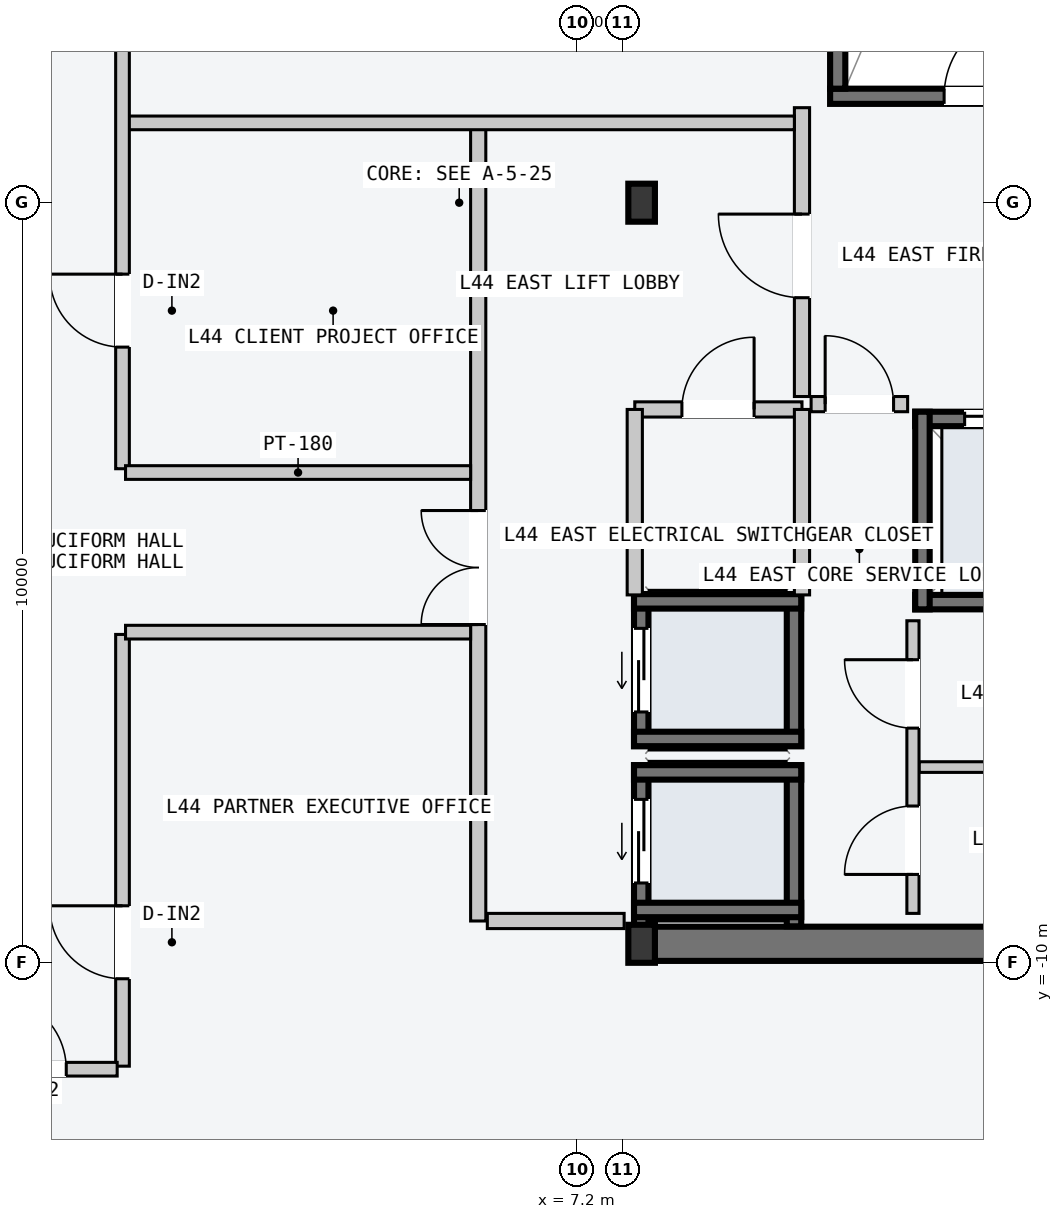
"""IFC4 building model, lengths in metres.
Left out: names, types, materials, properties, quantities, classifications, styles, units other than length and angle.
Written with IfcOpenShell. Run it as: python <this file> out.ifc"""

import sys

from ifc_helpers import new_model, si_unit, direction, frame, frame_2d, origin, origin_2d, place, context, subcontext, project, spatial, rectangle, i_section, extrude, element, fill, save


model = new_model("IFC4")
c1 = context("Model", 3, precision=1e-05, world=origin(), true_north=direction((0.0, 1.0)))
c2 = subcontext(c1, "Body", "Model", "MODEL_VIEW")
j1 = project(units=[si_unit("LENGTHUNIT", "METRE"), si_unit("PLANEANGLEUNIT", "RADIAN")], contexts=[c1])
p1 = place(None, origin())
s1 = spatial("IfcSite", under=j1, at=p1, CompositionType="ELEMENT")
p2 = place(p1, origin())
s2 = spatial("IfcBuilding", under=s1, at=p2, CompositionType="ELEMENT")
p3 = place(p2, frame((0.0, 0.0, 169.5)))
s3 = spatial("IfcBuildingStorey", under=s2, at=p3, CompositionType="ELEMENT", Elevation=169.5)
p4 = place(p3, frame((8.07, -9.75, -0.2), z_axis=(0.0, 0.0, 1.0), x_axis=(1.0, 0.0, 0.0)))
e1 = element("IfcWall", 1, at=p4, inside=s3, PredefinedType="SHEAR", context=c2, shape_type="SweptSolid", body=[
    extrude(rectangle(XDim=6.46, YDim=0.45, at=frame_2d((3.23, 0.0))), origin(), (0.0, 0.0, 1.0), 3.6),
])
p5 = place(p3, frame((10.53, 1.4, -0.2), z_axis=(0.0, 0.0, 1.0), x_axis=(1.0, 0.0, 0.0)))
e2 = element("IfcWall", 2, at=p5, inside=s3, PredefinedType="SOLIDWALL", context=c2, shape_type="SweptSolid", body=[
    extrude(rectangle(XDim=3.72, YDim=0.2, at=frame_2d((1.86, 0.0))), origin(), (0.0, 0.0, 1.0), 3.6),
])
p6 = place(p5, frame((1.5, 0.0, 0.2)))
e3 = element("IfcOpeningElement", 3, at=p6, cuts=e2, PredefinedType="OPENING", context=c2, shape_type="SweptSolid", body=[
    extrude(rectangle(XDim=1.12, YDim=2.18, at=frame_2d((0.56, 1.09))), frame((0.0, 0.11, 0.0), z_axis=(0.0, -1.0, 0.0), x_axis=(1.0, 0.0, 0.0)), (0.0, 0.0, 1.0), 0.22),
])
p7 = place(p3, frame((10.63, 1.5, -0.2), z_axis=(0.0, 0.0, 1.0), x_axis=(0.0, 1.0, 0.0)))
e4 = element("IfcWall", 4, at=p7, inside=s3, PredefinedType="SOLIDWALL", context=c2, shape_type="SweptSolid", body=[
    extrude(rectangle(XDim=7.8, YDim=0.2, at=frame_2d((3.9, 0.0))), origin(), (0.0, 0.0, 1.0), 3.6),
])
for number, where, z_axis, x_axis in (
    (5, (8.05, -9.75, 0.0), (0.0, 0.0, 1.0), (1.0, 0.0, 0.0)),
    (6, (8.05, 0.0, 0.0), (0.0, 0.0, 1.0), (1.0, 0.0, 0.0)),
):
    element("IfcColumn", number, at=place(p3, frame(where, z_axis=z_axis, x_axis=x_axis)), inside=s3, PredefinedType="COLUMN", context=c2, shape_type="SweptSolid", body=[
        extrude(i_section(OverallWidth=0.35, OverallDepth=0.5, WebThickness=0.02, FlangeThickness=0.032, at=origin_2d()), origin(), (0.0, 0.0, 1.0), 3.6),
    ])
p8 = place(p3, frame((8.045, -9.52, -0.2), z_axis=(0.0, 0.0, 1.0), x_axis=(0.0, 1.0, 0.0)))
e7 = element("IfcWall", 7, at=p8, inside=s3, PredefinedType="SOLIDWALL", context=c2, shape_type="SweptSolid", body=[
    extrude(rectangle(XDim=2.12, YDim=0.19, at=frame_2d((1.06, 0.0))), origin(), (0.0, 0.0, 1.0), 3.6),
])
p9 = place(p8, frame((0.57, 0.0, 0.2)))
e8 = element("IfcOpeningElement", 8, at=p9, cuts=e7, PredefinedType="OPENING", context=c2, shape_type="SweptSolid", body=[
    extrude(rectangle(XDim=1.1, YDim=2.2, at=frame_2d((0.55, 1.1))), frame((0.0, 0.105, 0.0), z_axis=(0.0, -1.0, 0.0), x_axis=(1.0, 0.0, 0.0)), (0.0, 0.0, 1.0), 0.21),
])
p10 = place(p3, frame((10.055, -9.52, -0.2), z_axis=(0.0, 0.0, 1.0), x_axis=(0.0, 1.0, 0.0)))
e9 = element("IfcWall", 9, at=p10, inside=s3, PredefinedType="SOLIDWALL", context=c2, shape_type="SweptSolid", body=[
    extrude(rectangle(XDim=2.12, YDim=0.19, at=frame_2d((1.06, 0.0))), origin(), (0.0, 0.0, 1.0), 3.6),
])
for number, where, z_axis, x_axis in (
    (10, (7.95, -7.495, -0.2), (0.0, 0.0, 1.0), (1.0, 0.0, 0.0)),
    (11, (7.95, -9.305, -0.2), (0.0, 0.0, 1.0), (1.0, 0.0, 0.0)),
):
    element("IfcWall", number, at=place(p3, frame(where, z_axis=z_axis, x_axis=x_axis)), inside=s3, PredefinedType="SOLIDWALL", context=c2, shape_type="SweptSolid", body=[
        extrude(rectangle(XDim=2.2, YDim=0.19, at=frame_2d((1.1, 0.0))), origin(), (0.0, 0.0, 1.0), 3.6),
    ])
p11 = place(p3, frame((8.045, -7.15, -0.2), z_axis=(0.0, 0.0, 1.0), x_axis=(0.0, 1.0, 0.0)))
e12 = element("IfcWall", 12, at=p11, inside=s3, PredefinedType="SOLIDWALL", context=c2, shape_type="SweptSolid", body=[
    extrude(rectangle(XDim=2.0, YDim=0.19, at=frame_2d((1.0, 0.0))), origin(), (0.0, 0.0, 1.0), 3.6),
])
p12 = place(p11, frame((0.45, 0.0, 0.2)))
e13 = element("IfcOpeningElement", 13, at=p12, cuts=e12, PredefinedType="OPENING", context=c2, shape_type="SweptSolid", body=[
    extrude(rectangle(XDim=1.1, YDim=2.2, at=frame_2d((0.55, 1.1))), frame((0.0, 0.105, 0.0), z_axis=(0.0, -1.0, 0.0), x_axis=(1.0, 0.0, 0.0)), (0.0, 0.0, 1.0), 0.21),
])
p13 = place(p3, frame((10.055, -7.15, -0.2), z_axis=(0.0, 0.0, 1.0), x_axis=(0.0, 1.0, 0.0)))
e14 = element("IfcWall", 14, at=p13, inside=s3, PredefinedType="SOLIDWALL", context=c2, shape_type="SweptSolid", body=[
    extrude(rectangle(XDim=2.0, YDim=0.19, at=frame_2d((1.0, 0.0))), origin(), (0.0, 0.0, 1.0), 3.6),
])
for number, where, z_axis, x_axis in (
    (15, (7.95, -5.245, -0.2), (0.0, 0.0, 1.0), (1.0, 0.0, 0.0)),
    (16, (7.95, -7.055, -0.2), (0.0, 0.0, 1.0), (1.0, 0.0, 0.0)),
):
    element("IfcWall", number, at=place(p3, frame(where, z_axis=z_axis, x_axis=x_axis)), inside=s3, PredefinedType="SOLIDWALL", context=c2, shape_type="SweptSolid", body=[
        extrude(rectangle(XDim=2.2, YDim=0.19, at=frame_2d((1.1, 0.0))), origin(), (0.0, 0.0, 1.0), 3.6),
    ])
p14 = place(p3, frame((11.65, -2.845, -0.2), z_axis=(0.0, 0.0, 1.0), x_axis=(1.0, 0.0, 0.0)))
e17 = element("IfcWall", 17, at=p14, inside=s3, PredefinedType="SOLIDWALL", context=c2, shape_type="SweptSolid", body=[
    extrude(rectangle(XDim=2.68, YDim=0.19, at=frame_2d((1.34, 0.0))), origin(), (0.0, 0.0, 1.0), 3.6),
])
p15 = place(p14, frame((0.65, 0.0, 0.2)))
e18 = element("IfcOpeningElement", 18, at=p15, cuts=e17, PredefinedType="OPENING", context=c2, shape_type="SweptSolid", body=[
    extrude(rectangle(XDim=1.2, YDim=2.2, at=frame_2d((0.6, 1.1))), frame((0.0, 0.105, 0.0), z_axis=(0.0, -1.0, 0.0), x_axis=(1.0, 0.0, 0.0)), (0.0, 0.0, 1.0), 0.21),
])
p16 = place(p3, frame((11.65, -5.255, -0.2), z_axis=(0.0, 0.0, 1.0), x_axis=(1.0, 0.0, 0.0)))
e19 = element("IfcWall", 19, at=p16, inside=s3, PredefinedType="SOLIDWALL", context=c2, shape_type="SweptSolid", body=[
    extrude(rectangle(XDim=2.68, YDim=0.19, at=frame_2d((1.34, 0.0))), origin(), (0.0, 0.0, 1.0), 3.6),
])
p17 = place(p3, frame((11.745, -5.35, -0.2), z_axis=(0.0, 0.0, 1.0), x_axis=(0.0, 1.0, 0.0)))
e20 = element("IfcWall", 20, at=p17, inside=s3, PredefinedType="SOLIDWALL", context=c2, shape_type="SweptSolid", body=[
    extrude(rectangle(XDim=2.6, YDim=0.19, at=frame_2d((1.3, 0.0))), origin(), (0.0, 0.0, 1.0), 3.6),
])
p18 = place(p3, frame((5.9, -9.45, 0.0), z_axis=(0.0, 0.0, 1.0), x_axis=(0.0, 1.0, 0.0)))
e21 = element("IfcWall", 21, at=p18, inside=s3, PredefinedType="PARTITIONING", context=c2, shape_type="SweptSolid", body=[
    extrude(rectangle(XDim=10.5, YDim=0.2, at=frame_2d((5.25, 0.0))), origin(), (0.0, 0.0, 1.0), 3.4),
])
p19 = place(p18, frame((3.9, 0.0, 0.0)))
e22 = element("IfcOpeningElement", 22, at=p19, cuts=e21, PredefinedType="OPENING", context=c2, shape_type="SweptSolid", body=[
    extrude(rectangle(XDim=1.5, YDim=2.2, at=frame_2d((0.75, 1.1))), frame((0.0, 0.11, 0.0), z_axis=(0.0, -1.0, 0.0), x_axis=(1.0, 0.0, 0.0)), (0.0, 0.0, 1.0), 0.22),
])
p20 = place(p3, frame((6.02, -9.45, 0.0), z_axis=(0.0, 0.0, 1.0), x_axis=(1.0, 0.0, 0.0)))
e23 = element("IfcWall", 23, at=p20, inside=s3, PredefinedType="PARTITIONING", context=c2, shape_type="SweptSolid", body=[
    extrude(rectangle(XDim=1.8, YDim=0.2, at=frame_2d((0.9, 0.0))), origin(), (0.0, 0.0, 1.0), 3.4),
])
p21 = place(p3, frame((10.16, -2.55, 0.0), z_axis=(0.0, 0.0, 1.0), x_axis=(0.0, 1.0, 0.0)))
e24 = element("IfcWall", 24, at=p21, inside=s3, PredefinedType="PARTITIONING", context=c2, shape_type="SweptSolid", body=[
    extrude(rectangle(XDim=3.8, YDim=0.2, at=frame_2d((1.9, 0.0))), origin(), (0.0, 0.0, 1.0), 3.4),
])
p22 = place(p21, frame((1.3, 0.0, 0.0)))
e25 = element("IfcOpeningElement", 25, at=p22, cuts=e24, PredefinedType="OPENING", context=c2, shape_type="SweptSolid", body=[
    extrude(rectangle(XDim=1.1, YDim=2.15, at=frame_2d((0.55, 1.075))), frame((0.0, 0.11, 0.0), z_axis=(0.0, -1.0, 0.0), x_axis=(1.0, 0.0, 0.0)), (0.0, 0.0, 1.0), 0.22),
])
p23 = place(p3, frame((10.28, -2.65, 0.0), z_axis=(0.0, 0.0, 1.0), x_axis=(1.0, 0.0, 0.0)))
e26 = element("IfcWall", 26, at=p23, inside=s3, PredefinedType="PARTITIONING", context=c2, shape_type="SweptSolid", body=[
    extrude(rectangle(XDim=1.27, YDim=0.2, at=frame_2d((0.635, 0.0))), origin(), (0.0, 0.0, 1.0), 3.4),
])
p24 = place(p23, frame((0.185, 0.0, 0.0)))
e27 = element("IfcOpeningElement", 27, at=p24, cuts=e26, PredefinedType="OPENING", context=c2, shape_type="SweptSolid", body=[
    extrude(rectangle(XDim=0.9, YDim=2.15, at=frame_2d((0.45, 1.075))), frame((0.0, 0.11, 0.0), z_axis=(0.0, -1.0, 0.0), x_axis=(1.0, 0.0, 0.0)), (0.0, 0.0, 1.0), 0.22),
])
p25 = place(p3, frame((7.96, -2.72, 0.0), z_axis=(0.0, 0.0, 1.0), x_axis=(1.0, 0.0, 0.0)))
e28 = element("IfcWall", 28, at=p25, inside=s3, PredefinedType="PARTITIONING", context=c2, shape_type="SweptSolid", body=[
    extrude(rectangle(XDim=2.2, YDim=0.2, at=frame_2d((1.1, 0.0))), origin(), (0.0, 0.0, 1.0), 3.4),
])
p26 = place(p25, frame((0.62, 0.0, 0.0)))
e29 = element("IfcOpeningElement", 29, at=p26, cuts=e28, PredefinedType="OPENING", context=c2, shape_type="SweptSolid", body=[
    extrude(rectangle(XDim=0.95, YDim=2.1, at=frame_2d((0.475, 1.05))), frame((0.0, 0.11, 0.0), z_axis=(0.0, -1.0, 0.0), x_axis=(1.0, 0.0, 0.0)), (0.0, 0.0, 1.0), 0.22),
])
for number, where, z_axis, x_axis in (
    (30, (7.96, -5.16, 0.0), (0.0, 0.0, 1.0), (0.0, 1.0, 0.0)),
    (31, (10.16, -5.16, 0.0), (0.0, 0.0, 1.0), (0.0, 1.0, 0.0)),
):
    element("IfcWall", number, at=place(p3, frame(where, z_axis=z_axis, x_axis=x_axis)), inside=s3, PredefinedType="PARTITIONING", context=c2, shape_type="SweptSolid", body=[
        extrude(rectangle(XDim=2.44, YDim=0.2, at=frame_2d((1.22, 0.0))), origin(), (0.0, 0.0, 1.0), 3.4),
    ])
p27 = place(p3, frame((11.7, -7.425, 0.0), z_axis=(0.0, 0.0, 1.0), x_axis=(1.0, 0.0, 0.0)))
e32 = element("IfcWall", 32, at=p27, inside=s3, PredefinedType="PARTITIONING", context=c2, shape_type="SweptSolid", body=[
    extrude(rectangle(XDim=2.5, YDim=0.14, at=frame_2d((1.25, 0.0))), origin(), (0.0, 0.0, 1.0), 3.4),
])
p28 = place(p3, frame((11.62, -9.35, 0.0), z_axis=(0.0, 0.0, 1.0), x_axis=(0.0, 1.0, 0.0)))
e33 = element("IfcWall", 33, at=p28, inside=s3, PredefinedType="PARTITIONING", context=c2, shape_type="SweptSolid", body=[
    extrude(rectangle(XDim=3.85, YDim=0.16, at=frame_2d((1.925, 0.0))), origin(), (0.0, 0.0, 1.0), 3.4),
])
p29 = place(p28, frame((0.512, 0.0, 0.0)))
e34 = element("IfcOpeningElement", 34, at=p29, cuts=e33, PredefinedType="OPENING", context=c2, shape_type="SweptSolid", body=[
    extrude(rectangle(XDim=0.9, YDim=2.15, at=frame_2d((0.45, 1.075))), frame((0.0, 0.09, 0.0), z_axis=(0.0, -1.0, 0.0), x_axis=(1.0, 0.0, 0.0)), (0.0, 0.0, 1.0), 0.18),
])
p30 = place(p28, frame((2.438, 0.0, 0.0)))
e35 = element("IfcOpeningElement", 35, at=p30, cuts=e33, PredefinedType="OPENING", context=c2, shape_type="SweptSolid", body=[
    extrude(rectangle(XDim=0.9, YDim=2.15, at=frame_2d((0.45, 1.075))), frame((0.0, 0.09, 0.0), z_axis=(0.0, -1.0, 0.0), x_axis=(1.0, 0.0, 0.0)), (0.0, 0.0, 1.0), 0.18),
])
p31 = place(p3, frame((1.26, 1.05, 0.0), z_axis=(0.0, 0.0, 1.0), x_axis=(1.0, 0.0, 0.0)))
e36 = element("IfcWall", 36, at=p31, inside=s3, PredefinedType="PARTITIONING", context=c2, shape_type="SweptSolid", body=[
    extrude(rectangle(XDim=8.8, YDim=0.18, at=frame_2d((4.4, 0.0))), origin(), (0.0, 0.0, 1.0), 3.4),
])
p32 = place(p3, frame((1.22, -3.5, 0.0), z_axis=(0.0, 0.0, 1.0), x_axis=(0.0, 1.0, 0.0)))
e37 = element("IfcWall", 37, at=p32, inside=s3, PredefinedType="PARTITIONING", context=c2, shape_type="SweptSolid", body=[
    extrude(rectangle(XDim=14.86, YDim=0.18, at=frame_2d((7.43, 0.0))), origin(), (0.0, 0.0, 1.0), 3.4),
])
p33 = place(p32, frame((6.1, 0.0, 0.0)))
e38 = element("IfcOpeningElement", 38, at=p33, cuts=e37, PredefinedType="OPENING", context=c2, shape_type="SweptSolid", body=[
    extrude(rectangle(XDim=1.24, YDim=2.24, at=frame_2d((0.62, 1.12))), frame((0.0, 0.1, 0.0), z_axis=(0.0, -1.0, 0.0), x_axis=(1.0, 0.0, 0.0)), (0.0, 0.0, 1.0), 0.2),
])
p34 = place(p32, frame((1.6, 0.0, 0.0)))
e39 = element("IfcOpeningElement", 39, at=p34, cuts=e37, PredefinedType="OPENING", context=c2, shape_type="SweptSolid", body=[
    extrude(rectangle(XDim=0.96, YDim=2.18, at=frame_2d((0.48, 1.09))), frame((0.0, 0.1, 0.0), z_axis=(0.0, -1.0, 0.0), x_axis=(1.0, 0.0, 0.0)), (0.0, 0.0, 1.0), 0.2),
])
p35 = place(p3, frame((1.26, -3.55, 0.0), z_axis=(0.0, 0.0, 1.0), x_axis=(1.0, 0.0, 0.0)))
e40 = element("IfcWall", 40, at=p35, inside=s3, PredefinedType="PARTITIONING", context=c2, shape_type="SweptSolid", body=[
    extrude(rectangle(XDim=4.54, YDim=0.18, at=frame_2d((2.27, 0.0))), origin(), (0.0, 0.0, 1.0), 3.4),
])
p36 = place(p3, frame((1.22, -11.36, 0.0), z_axis=(0.0, 0.0, 1.0), x_axis=(0.0, 1.0, 0.0)))
e41 = element("IfcWall", 41, at=p36, inside=s3, PredefinedType="PARTITIONING", context=c2, shape_type="SweptSolid", body=[
    extrude(rectangle(XDim=5.68, YDim=0.18, at=frame_2d((2.84, 0.0))), origin(), (0.0, 0.0, 1.0), 3.4),
])
p37 = place(p36, frame((1.15, 0.0, 0.0)))
e42 = element("IfcOpeningElement", 42, at=p37, cuts=e41, PredefinedType="OPENING", context=c2, shape_type="SweptSolid", body=[
    extrude(rectangle(XDim=0.96, YDim=2.18, at=frame_2d((0.48, 1.09))), frame((0.0, 0.1, 0.0), z_axis=(0.0, -1.0, 0.0), x_axis=(1.0, 0.0, 0.0)), (0.0, 0.0, 1.0), 0.2),
])
p38 = place(p3, frame((1.26, -5.65, 0.0), z_axis=(0.0, 0.0, 1.0), x_axis=(1.0, 0.0, 0.0)))
e43 = element("IfcWall", 43, at=p38, inside=s3, PredefinedType="PARTITIONING", context=c2, shape_type="SweptSolid", body=[
    extrude(rectangle(XDim=4.54, YDim=0.18, at=frame_2d((2.27, 0.0))), origin(), (0.0, 0.0, 1.0), 3.4),
])
p39 = place(p3, frame((-1.15, -11.4, 0.0), z_axis=(0.0, 0.0, 1.0), x_axis=(1.0, 0.0, 0.0)))
e44 = element("IfcWall", 44, at=p39, inside=s3, PredefinedType="PARTITIONING", context=c2, shape_type="SweptSolid", body=[
    extrude(rectangle(XDim=2.3, YDim=0.18, at=frame_2d((1.15, 0.0))), origin(), (0.0, 0.0, 1.0), 3.4),
])
p40 = place(p39, frame((0.67, 0.0, 0.0)))
e45 = element("IfcOpeningElement", 45, at=p40, cuts=e44, PredefinedType="OPENING", context=c2, shape_type="SweptSolid", body=[
    extrude(rectangle(XDim=0.96, YDim=2.18, at=frame_2d((0.48, 1.09))), frame((0.0, 0.1, 0.0), z_axis=(0.0, -1.0, 0.0), x_axis=(1.0, 0.0, 0.0)), (0.0, 0.0, 1.0), 0.2),
])
p41 = place(p6, origin())
e46 = element("IfcDoor", 46, at=p41, inside=s3, OperationType="SINGLE_SWING_RIGHT", PredefinedType="DOOR", context=c2, shape_type="SweptSolid", body=[
    extrude(rectangle(XDim=1.12, YDim=2.18, at=frame_2d((0.56, 1.09))), frame((0.0, 0.025, 0.0), z_axis=(0.0, -1.0, 0.0), x_axis=(1.0, 0.0, 0.0)), (0.0, 0.0, 1.0), 0.05),
])
fill(e3, e46)
p42 = place(p9, origin())
e47 = element("IfcDoor", 47, at=p42, inside=s3, OperationType="SLIDING_TO_LEFT", PredefinedType="DOOR", context=c2, shape_type="SweptSolid", body=[
    extrude(rectangle(XDim=1.1, YDim=2.2, at=frame_2d((0.55, 1.1))), frame((0.0, 0.025, 0.0), z_axis=(0.0, -1.0, 0.0), x_axis=(1.0, 0.0, 0.0)), (0.0, 0.0, 1.0), 0.05),
])
fill(e8, e47)
p43 = place(p12, origin())
e48 = element("IfcDoor", 48, at=p43, inside=s3, OperationType="SLIDING_TO_LEFT", PredefinedType="DOOR", context=c2, shape_type="SweptSolid", body=[
    extrude(rectangle(XDim=1.1, YDim=2.2, at=frame_2d((0.55, 1.1))), frame((0.0, 0.025, 0.0), z_axis=(0.0, -1.0, 0.0), x_axis=(1.0, 0.0, 0.0)), (0.0, 0.0, 1.0), 0.05),
])
fill(e13, e48)
p44 = place(p15, origin())
e49 = element("IfcDoor", 49, at=p44, inside=s3, OperationType="SLIDING_TO_LEFT", PredefinedType="DOOR", context=c2, shape_type="SweptSolid", body=[
    extrude(rectangle(XDim=1.2, YDim=2.2, at=frame_2d((0.6, 1.1))), frame((0.0, 0.025, 0.0), z_axis=(0.0, -1.0, 0.0), x_axis=(1.0, 0.0, 0.0)), (0.0, 0.0, 1.0), 0.05),
])
fill(e18, e49)
p45 = place(p19, origin())
e50 = element("IfcDoor", 50, at=p45, inside=s3, OperationType="DOUBLE_DOOR_SINGLE_SWING", PredefinedType="DOOR", context=c2, shape_type="SweptSolid", body=[
    extrude(rectangle(XDim=1.5, YDim=2.2, at=frame_2d((0.75, 1.1))), frame((0.0, 0.025, 0.0), z_axis=(0.0, -1.0, 0.0), x_axis=(1.0, 0.0, 0.0)), (0.0, 0.0, 1.0), 0.05),
])
fill(e22, e50)
p46 = place(p22, origin())
e51 = element("IfcDoor", 51, at=p46, inside=s3, OperationType="SINGLE_SWING_RIGHT", PredefinedType="DOOR", context=c2, shape_type="SweptSolid", body=[
    extrude(rectangle(XDim=1.1, YDim=2.15, at=frame_2d((0.55, 1.075))), frame((0.0, 0.025, 0.0), z_axis=(0.0, -1.0, 0.0), x_axis=(1.0, 0.0, 0.0)), (0.0, 0.0, 1.0), 0.05),
])
fill(e25, e51)
p47 = place(p24, origin())
e52 = element("IfcDoor", 52, at=p47, inside=s3, OperationType="SINGLE_SWING_LEFT", PredefinedType="DOOR", context=c2, shape_type="SweptSolid", body=[
    extrude(rectangle(XDim=0.9, YDim=2.15, at=frame_2d((0.45, 1.075))), frame((0.0, 0.025, 0.0), z_axis=(0.0, -1.0, 0.0), x_axis=(1.0, 0.0, 0.0)), (0.0, 0.0, 1.0), 0.05),
])
fill(e27, e52)
p48 = place(p26, origin())
e53 = element("IfcDoor", 53, at=p48, inside=s3, OperationType="SINGLE_SWING_RIGHT", PredefinedType="DOOR", context=c2, shape_type="SweptSolid", body=[
    extrude(rectangle(XDim=0.95, YDim=2.1, at=frame_2d((0.475, 1.05))), frame((0.0, 0.025, 0.0), z_axis=(0.0, -1.0, 0.0), x_axis=(1.0, 0.0, 0.0)), (0.0, 0.0, 1.0), 0.05),
])
fill(e29, e53)
p49 = place(p29, origin())
e54 = element("IfcDoor", 54, at=p49, inside=s3, OperationType="SINGLE_SWING_LEFT", PredefinedType="DOOR", context=c2, shape_type="SweptSolid", body=[
    extrude(rectangle(XDim=0.9, YDim=2.15, at=frame_2d((0.45, 1.075))), frame((0.0, 0.025, 0.0), z_axis=(0.0, -1.0, 0.0), x_axis=(1.0, 0.0, 0.0)), (0.0, 0.0, 1.0), 0.05),
])
fill(e34, e54)
p50 = place(p30, origin())
e55 = element("IfcDoor", 55, at=p50, inside=s3, OperationType="SINGLE_SWING_RIGHT", PredefinedType="DOOR", context=c2, shape_type="SweptSolid", body=[
    extrude(rectangle(XDim=0.9, YDim=2.15, at=frame_2d((0.45, 1.075))), frame((0.0, 0.025, 0.0), z_axis=(0.0, -1.0, 0.0), x_axis=(1.0, 0.0, 0.0)), (0.0, 0.0, 1.0), 0.05),
])
fill(e35, e55)
p51 = place(p34, origin())
e56 = element("IfcDoor", 56, at=p51, inside=s3, OperationType="SINGLE_SWING_RIGHT", PredefinedType="DOOR", context=c2, shape_type="SweptSolid", body=[
    extrude(rectangle(XDim=0.96, YDim=2.18, at=frame_2d((0.48, 1.09))), frame((0.0, 0.025, 0.0), z_axis=(0.0, -1.0, 0.0), x_axis=(1.0, 0.0, 0.0)), (0.0, 0.0, 1.0), 0.05),
])
fill(e39, e56)
p52 = place(p37, origin())
e57 = element("IfcDoor", 57, at=p52, inside=s3, OperationType="SINGLE_SWING_RIGHT", PredefinedType="DOOR", context=c2, shape_type="SweptSolid", body=[
    extrude(rectangle(XDim=0.96, YDim=2.18, at=frame_2d((0.48, 1.09))), frame((0.0, 0.025, 0.0), z_axis=(0.0, -1.0, 0.0), x_axis=(1.0, 0.0, 0.0)), (0.0, 0.0, 1.0), 0.05),
])
fill(e42, e57)
p53 = place(p40, origin())
e58 = element("IfcDoor", 58, at=p53, inside=s3, OperationType="SINGLE_SWING_LEFT", PredefinedType="DOOR", context=c2, shape_type="SweptSolid", body=[
    extrude(rectangle(XDim=0.96, YDim=2.18, at=frame_2d((0.48, 1.09))), frame((0.0, 0.025, 0.0), z_axis=(0.0, -1.0, 0.0), x_axis=(1.0, 0.0, 0.0)), (0.0, 0.0, 1.0), 0.05),
])
fill(e45, e58)
save(model, sys.argv[1])
